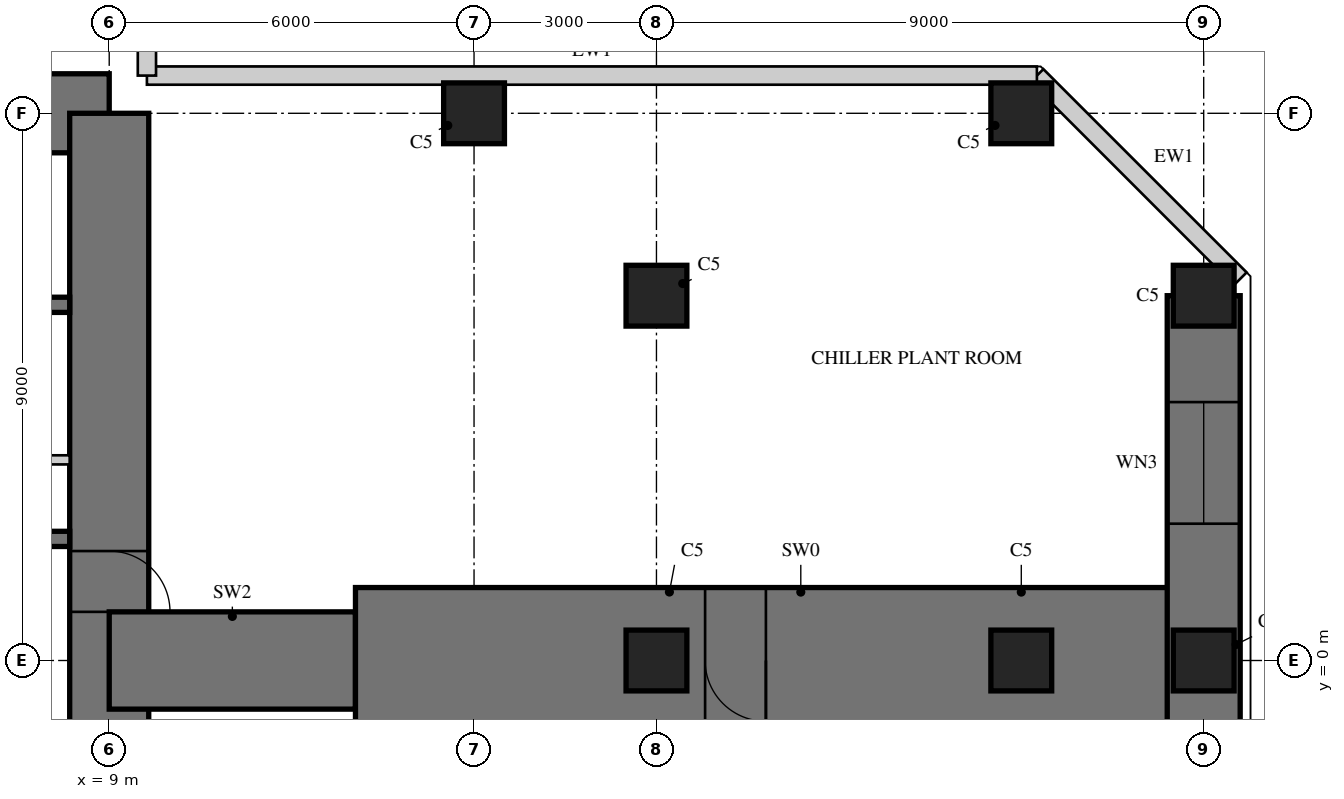
"""IFC4 building model, lengths in metres.
Left out: names, types, materials, properties, quantities, classifications, styles, units other than length and angle.
Written with IfcOpenShell. Run it as: python <this file> out.ifc"""

import sys

from ifc_helpers import new_model, si_unit, direction, frame, frame_2d, origin, origin_2d, place, context, subcontext, project, spatial, rectangle, hollow_rectangle, extrude, element, fill, save


model = new_model("IFC4")
c1 = context("Model", 3, precision=1e-05, world=origin(), true_north=direction((0.0, 1.0)))
c2 = subcontext(c1, "Body", "Model", "MODEL_VIEW")
j1 = project(units=[si_unit("LENGTHUNIT", "METRE"), si_unit("PLANEANGLEUNIT", "RADIAN")], contexts=[c1])
p1 = place(None, origin())
s1 = spatial("IfcSite", under=j1, at=p1, CompositionType="ELEMENT")
p2 = place(p1, origin())
s2 = spatial("IfcBuilding", under=s1, at=p2, CompositionType="ELEMENT")
p3 = place(p2, frame((0.0, 0.0, 164.5)))
s3 = spatial("IfcBuildingStorey", under=s2, at=p3, CompositionType="ELEMENT", Elevation=164.5)
p4 = place(p3, frame((9.0, 9.0, 0.0), z_axis=(0.0, 0.0, 1.0), x_axis=(-1.0, 0.0, 0.0)))
e1 = element("IfcWall", 1, at=p4, inside=s3, PredefinedType="SHEAR", context=c2, shape_type="SweptSolid", body=[
    extrude(rectangle(XDim=18.0, YDim=1.3, at=frame_2d((9.0, 0.0))), origin(), (0.0, 0.0, 1.0), 5.0),
])
p5 = place(p4, frame((9.8, 0.0, 0.0)))
e2 = element("IfcOpeningElement", 2, at=p5, cuts=e1, PredefinedType="OPENING", context=c2, shape_type="SweptSolid", body=[
    extrude(rectangle(XDim=1.0, YDim=2.4, at=frame_2d((0.5, 1.2))), frame((0.0, 0.66, 0.0), z_axis=(0.0, -1.0, 0.0), x_axis=(1.0, 0.0, 0.0)), (0.0, 0.0, 1.0), 1.32),
])
p6 = place(p3, frame((9.0, -9.0, 0.0), z_axis=(0.0, 0.0, 1.0), x_axis=(0.0, 1.0, 0.0)))
e3 = element("IfcWall", 3, at=p6, inside=s3, PredefinedType="SHEAR", context=c2, shape_type="SweptSolid", body=[
    extrude(rectangle(XDim=18.0, YDim=1.3, at=frame_2d((9.0, 0.0))), origin(), (0.0, 0.0, 1.0), 5.0),
])
p7 = place(p6, frame((9.8, 0.0, 0.0)))
e4 = element("IfcOpeningElement", 4, at=p7, cuts=e3, PredefinedType="OPENING", context=c2, shape_type="SweptSolid", body=[
    extrude(rectangle(XDim=1.0, YDim=2.4, at=frame_2d((0.5, 1.2))), frame((0.0, 0.66, 0.0), z_axis=(0.0, -1.0, 0.0), x_axis=(1.0, 0.0, 0.0)), (0.0, 0.0, 1.0), 1.32),
])
for number, where, z_axis, x_axis in (
    (5, (1.925, 2.0, 0.0), (0.0, 0.0, 1.0), (1.0, 0.0, 0.0)),
    (6, (1.925, 5.85, 0.0), (0.0, 0.0, 1.0), (1.0, 0.0, 0.0)),
):
    element("IfcWall", number, at=place(p3, frame(where, z_axis=z_axis, x_axis=x_axis)), inside=s3, PredefinedType="SHEAR", context=c2, shape_type="SweptSolid", body=[
        extrude(rectangle(XDim=6.425, YDim=0.25, at=frame_2d((3.212, 0.0))), origin(), (0.0, 0.0, 1.0), 5.0),
    ])
p8 = place(p3, frame((1.925, 3.3, 0.0), z_axis=(0.0, 0.0, 1.0), x_axis=(1.0, 0.0, 0.0)))
e7 = element("IfcWall", 7, at=p8, inside=s3, PredefinedType="PARTITIONING", context=c2, shape_type="SweptSolid", body=[
    extrude(rectangle(XDim=6.425, YDim=0.15, at=frame_2d((3.212, 0.0))), origin(), (0.0, 0.0, 1.0), 5.0),
])
p9 = place(p8, frame((0.075, 0.0, 0.0)))
e8 = element("IfcOpeningElement", 8, at=p9, cuts=e7, PredefinedType="OPENING", context=c2, shape_type="SweptSolid", body=[
    extrude(rectangle(XDim=0.8, YDim=2.1, at=frame_2d((0.4, 1.05))), frame((0.0, 0.085, 0.0), z_axis=(0.0, -1.0, 0.0), x_axis=(1.0, 0.0, 0.0)), (0.0, 0.0, 1.0), 0.17),
])
p10 = place(p8, frame((3.675, 0.0, 0.0)))
e9 = element("IfcOpeningElement", 9, at=p10, cuts=e7, PredefinedType="OPENING", context=c2, shape_type="SweptSolid", body=[
    extrude(rectangle(XDim=0.8, YDim=2.1, at=frame_2d((0.4, 1.05))), frame((0.0, 0.085, 0.0), z_axis=(0.0, -1.0, 0.0), x_axis=(1.0, 0.0, 0.0)), (0.0, 0.0, 1.0), 0.17),
])
p11 = place(p3, frame((9.0, 0.0, 0.0), z_axis=(0.0, 0.0, 1.0), x_axis=(1.0, 0.0, 0.0)))
e10 = element("IfcWall", 10, at=p11, inside=s3, PredefinedType="SHEAR", context=c2, shape_type="SweptSolid", body=[
    extrude(rectangle(XDim=4.05, YDim=1.6, at=frame_2d((2.025, 0.0))), origin(), (0.0, 0.0, 1.0), 5.0),
])
p12 = place(p3, frame((13.05, 0.0, 0.0), z_axis=(0.0, 0.0, 1.0), x_axis=(1.0, 0.0, 0.0)))
e11 = element("IfcWall", 11, at=p12, inside=s3, PredefinedType="SHEAR", context=c2, shape_type="SweptSolid", body=[
    extrude(rectangle(XDim=13.95, YDim=2.4, at=frame_2d((6.975, 0.0))), origin(), (0.0, 0.0, 1.0), 5.0),
])
p13 = place(p12, frame((5.75, 0.0, 0.0)))
e12 = element("IfcOpeningElement", 12, at=p13, cuts=e11, PredefinedType="OPENING", context=c2, shape_type="SweptSolid", body=[
    extrude(rectangle(XDim=1.0, YDim=2.2, at=frame_2d((0.5, 1.1))), frame((0.0, 1.21, 0.0), z_axis=(0.0, -1.0, 0.0), x_axis=(1.0, 0.0, 0.0)), (0.0, 0.0, 1.0), 2.42),
])
p14 = place(p3, frame((27.0, -6.0, 0.0), z_axis=(0.0, 0.0, 1.0), x_axis=(0.0, 1.0, 0.0)))
e13 = element("IfcWall", 13, at=p14, inside=s3, PredefinedType="SHEAR", context=c2, shape_type="SweptSolid", body=[
    extrude(rectangle(XDim=12.0, YDim=1.2, at=frame_2d((6.0, 0.0))), origin(), (0.0, 0.0, 1.0), 5.0),
])
p15 = place(p14, frame((1.75, 0.0, 0.8)))
e14 = element("IfcOpeningElement", 14, at=p15, cuts=e13, PredefinedType="OPENING", context=c2, shape_type="SweptSolid", body=[
    extrude(rectangle(XDim=2.0, YDim=2.5, at=frame_2d((1.0, 1.25))), frame((0.0, 0.61, 0.0), z_axis=(0.0, -1.0, 0.0), x_axis=(1.0, 0.0, 0.0)), (0.0, 0.0, 1.0), 1.22),
])
p16 = place(p14, frame((8.25, 0.0, 0.8)))
e15 = element("IfcOpeningElement", 15, at=p16, cuts=e13, PredefinedType="OPENING", context=c2, shape_type="SweptSolid", body=[
    extrude(rectangle(XDim=2.0, YDim=2.5, at=frame_2d((1.0, 1.25))), frame((0.0, 0.61, 0.0), z_axis=(0.0, -1.0, 0.0), x_axis=(1.0, 0.0, 0.0)), (0.0, 0.0, 1.0), 1.22),
])
for number, where, z_axis, x_axis in (
    (16, (15.0, 9.0, 0.0), (0.0, 0.0, 1.0), (1.0, 0.0, 0.0)),
    (17, (24.0, 9.0, 0.0), (0.0, 0.0, 1.0), (1.0, 0.0, 0.0)),
    (18, (27.0, 0.0, 0.0), (0.0, 0.0, 1.0), (1.0, 0.0, 0.0)),
    (19, (27.0, 6.0, 0.0), (0.0, 0.0, 1.0), (1.0, 0.0, 0.0)),
    (20, (18.0, 0.0, 0.0), (0.0, 0.0, 1.0), (1.0, 0.0, 0.0)),
    (21, (18.0, 6.0, 0.0), (0.0, 0.0, 1.0), (1.0, 0.0, 0.0)),
    (22, (24.0, 0.0, 0.0), (0.0, 0.0, 1.0), (1.0, 0.0, 0.0)),
):
    element("IfcColumn", number, at=place(p3, frame(where, z_axis=z_axis, x_axis=x_axis)), inside=s3, PredefinedType="COLUMN", context=c2, shape_type="SweptSolid", body=[
        extrude(rectangle(XDim=1.0, YDim=1.0, at=origin_2d()), origin(), (0.0, 0.0, 1.0), 5.0),
    ])
p17 = place(p3, frame((27.6, 6.277, 0.0), z_axis=(0.0, 0.0, 1.0), x_axis=(-0.707106781187, 0.707106781187, 0.0)))
e23 = element("IfcWall", 23, at=p17, inside=s3, PredefinedType="SOLIDWALL", context=c2, shape_type="SweptSolid", body=[
    extrude(rectangle(XDim=4.728, YDim=0.3, at=frame_2d((2.364, 0.0))), origin(), (0.0, 0.0, 1.0), 4.82),
])
p18 = place(p3, frame((24.257, 9.62, 0.0), z_axis=(0.0, 0.0, 1.0), x_axis=(-1.0, 0.0, 0.0)))
e24 = element("IfcWall", 24, at=p18, inside=s3, PredefinedType="SOLIDWALL", context=c2, shape_type="SweptSolid", body=[
    extrude(rectangle(XDim=14.637, YDim=0.3, at=frame_2d((7.318, 0.0))), origin(), (0.0, 0.0, 1.0), 4.82),
])
p19 = place(p3, frame((9.62, 9.62, 0.0), z_axis=(0.0, 0.0, 1.0), x_axis=(0.0, 1.0, 0.0)))
e25 = element("IfcWall", 25, at=p19, inside=s3, PredefinedType="SOLIDWALL", context=c2, shape_type="SweptSolid", body=[
    extrude(rectangle(XDim=5.637, YDim=0.3, at=frame_2d((2.818, 0.0))), origin(), (0.0, 0.0, 1.0), 4.82),
])
p20 = place(p16, origin())
e26 = element("IfcWindow", 26, at=p20, inside=s3, PartitioningType="SINGLE_PANEL", PredefinedType="WINDOW", context=c2, shape_type="SweptSolid", body=[
    extrude(hollow_rectangle(XDim=2.0, YDim=2.5, WallThickness=0.06, at=frame_2d((1.0, 1.25))), frame((0.0, 0.03, 0.0), z_axis=(0.0, -1.0, 0.0), x_axis=(1.0, 0.0, 0.0)), (0.0, 0.0, 1.0), 0.06),
    extrude(rectangle(XDim=1.879, YDim=2.379, at=frame_2d((1.0, 1.25))), frame((0.0, 0.03, 0.0), z_axis=(0.0, -1.0, 0.0), x_axis=(1.0, 0.0, 0.0)), (0.0, 0.0, 1.0), 0.06),
])
fill(e15, e26)
p21 = place(p13, frame((1.0, 0.0, 0.0), z_axis=(0.0, 0.0, 1.0), x_axis=(-1.0, 0.0, 0.0)))
e27 = element("IfcDoor", 27, at=p21, inside=s3, OperationType="SINGLE_SWING_LEFT", PredefinedType="DOOR", context=c2, shape_type="SweptSolid", body=[
    extrude(rectangle(XDim=1.0, YDim=2.2, at=frame_2d((0.5, 1.1))), frame((0.0, 0.025, 0.0), z_axis=(0.0, -1.0, 0.0), x_axis=(1.0, 0.0, 0.0)), (0.0, 0.0, 1.0), 0.05),
])
fill(e12, e27)
p22 = place(p7, frame((1.0, 0.0, 0.0), z_axis=(0.0, 0.0, 1.0), x_axis=(-1.0, 0.0, 0.0)))
e28 = element("IfcDoor", 28, at=p22, inside=s3, OperationType="SINGLE_SWING_RIGHT", PredefinedType="DOOR", context=c2, shape_type="SweptSolid", body=[
    extrude(rectangle(XDim=1.0, YDim=2.4, at=frame_2d((0.5, 1.2))), frame((0.0, -0.005, 0.0), z_axis=(0.0, -1.0, 0.0), x_axis=(1.0, 0.0, 0.0)), (0.0, 0.0, 1.0), 0.05),
])
fill(e4, e28)
save(model, sys.argv[1])
